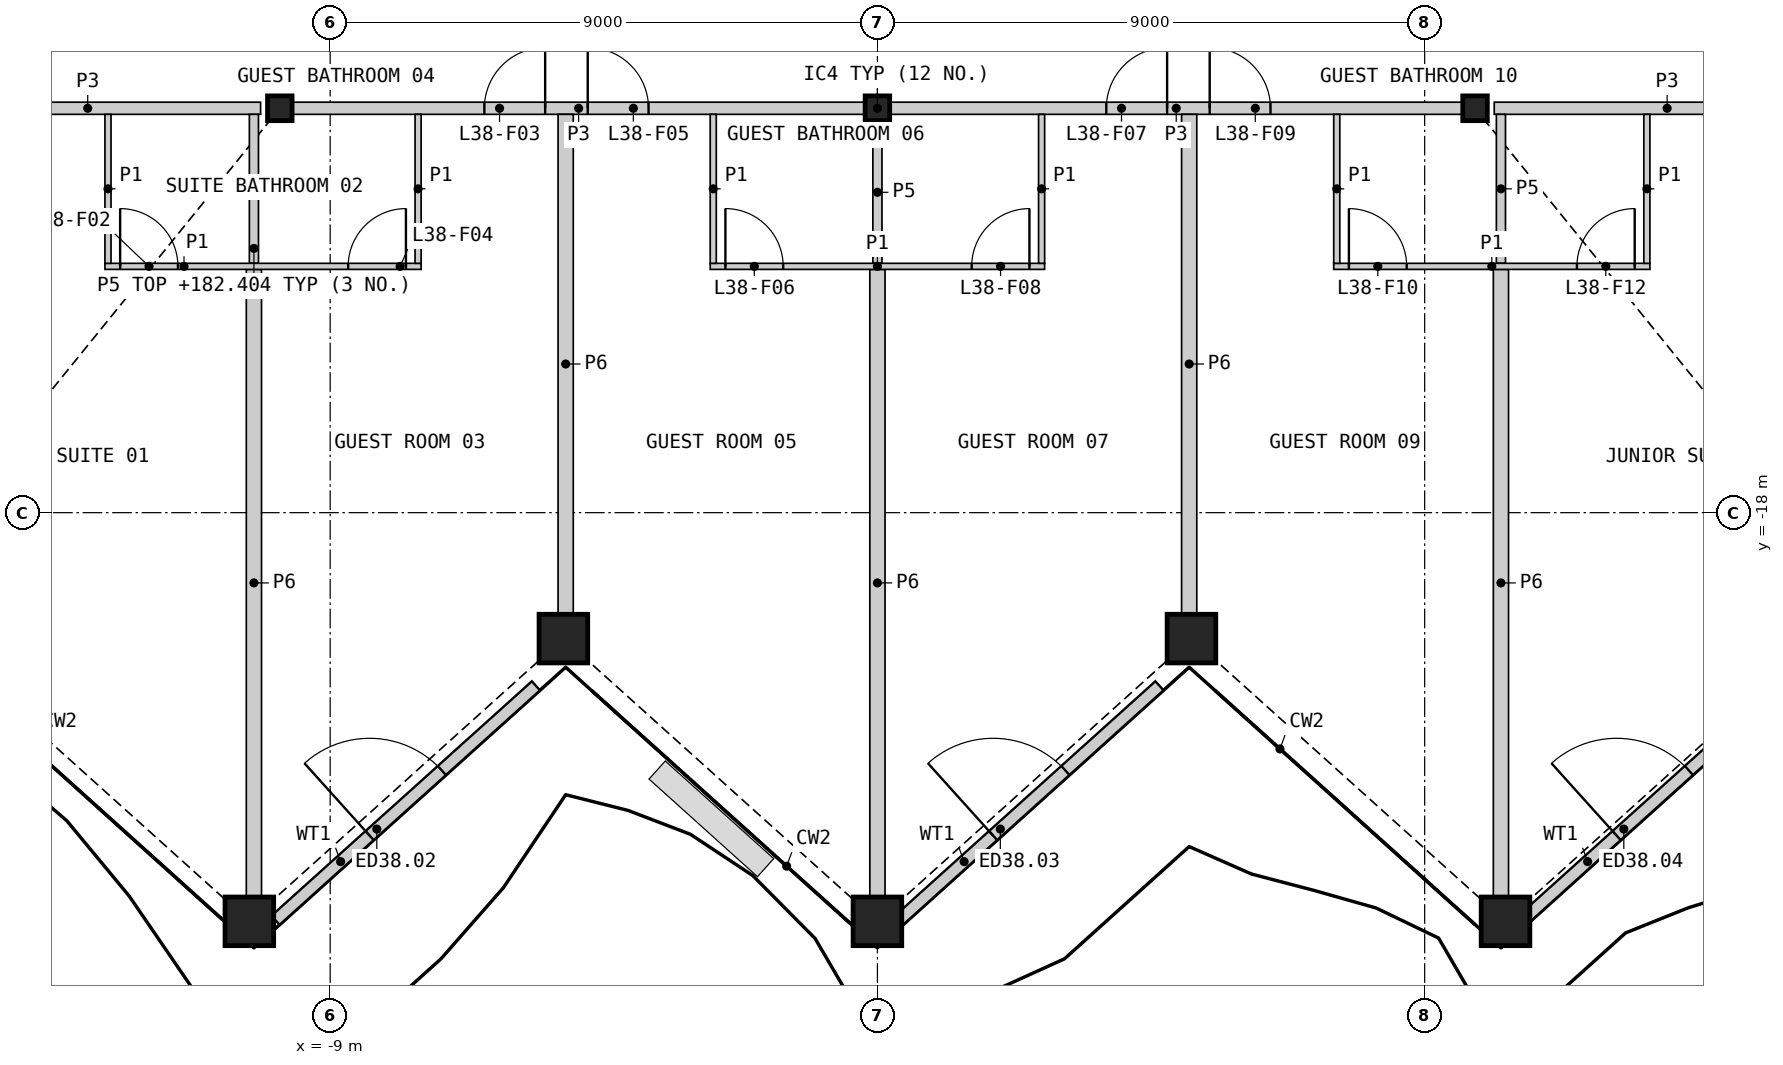
"""IFC4 building model, lengths in metres.
Left out: names, types, materials, properties, quantities, classifications, styles, units other than length and angle.
Written with IfcOpenShell. Run it as: python <this file> out.ifc"""

import sys

from ifc_helpers import new_model, si_unit, direction, frame, frame_2d, origin, origin_2d, place, context, subcontext, project, spatial, rectangle, hollow_rectangle, i_section, extrude, element, fill, save


model = new_model("IFC4")
c1 = context("Model", 3, precision=1e-05, world=origin(), true_north=direction((0.0, 1.0)))
c2 = subcontext(c1, "Body", "Model", "MODEL_VIEW")
j1 = project(units=[si_unit("LENGTHUNIT", "METRE"), si_unit("PLANEANGLEUNIT", "RADIAN")], contexts=[c1])
p1 = place(None, origin())
s1 = spatial("IfcSite", under=j1, at=p1, CompositionType="ELEMENT")
p2 = place(p1, origin())
s2 = spatial("IfcBuilding", under=s1, at=p2, CompositionType="ELEMENT")
p3 = place(p2, frame((0.0, 0.0, 180.0)))
s3 = spatial("IfcBuildingStorey", under=s2, at=p3, CompositionType="ELEMENT", Elevation=180.0)
for number, where, z_axis, x_axis in (
    (1, (-10.329, -24.722, 0.0), (0.0, 0.0, 1.0), (1.0, 0.0, 0.0)),
    (2, (-5.165, -20.071, 0.0), (0.0, 0.0, 1.0), (1.0, 0.0, 0.0)),
    (3, (0.0, -24.722, 0.0), (0.0, 0.0, 1.0), (1.0, 0.0, 0.0)),
    (4, (5.165, -20.071, 0.0), (0.0, 0.0, 1.0), (1.0, 0.0, 0.0)),
    (5, (10.329, -24.722, 0.0), (0.0, 0.0, 1.0), (1.0, 0.0, 0.0)),
):
    element("IfcColumn", number, at=place(p3, frame(where, z_axis=z_axis, x_axis=x_axis)), inside=s3, PredefinedType="COLUMN", context=c2, shape_type="SweptSolid", body=[
        extrude(hollow_rectangle(XDim=0.8, YDim=0.8, WallThickness=0.05, at=origin_2d()), origin(), (0.0, 0.0, 1.0), 3.6),
    ])
for number, where, z_axis, x_axis in (
    (6, (-9.828, -11.349, 0.0), (0.0, 0.0, 1.0), (1.0, 0.0, 0.0)),
    (7, (0.0, -11.349, 0.0), (0.0, 0.0, 1.0), (1.0, 0.0, 0.0)),
    (8, (9.828, -11.349, 0.0), (0.0, 0.0, 1.0), (1.0, 0.0, 0.0)),
):
    element("IfcColumn", number, at=place(p3, frame(where, z_axis=z_axis, x_axis=x_axis)), inside=s3, PredefinedType="COLUMN", context=c2, shape_type="SweptSolid", body=[
        extrude(i_section(OverallWidth=0.404, OverallDepth=0.407, WebThickness=0.027, FlangeThickness=0.044, at=origin_2d()), origin(), (0.0, 0.0, 1.0), 3.6),
    ])
p4 = place(p3, frame((-9.899, -24.704, 0.0), z_axis=(0.0, 0.0, 1.0), x_axis=(0.74312139518, 0.669156627424, 0.0)))
e9 = element("IfcWall", 9, at=p4, inside=s3, PredefinedType="SOLIDWALL", context=c2, shape_type="SweptSolid", body=[
    extrude(rectangle(XDim=5.763, YDim=0.2, at=frame_2d((2.882, 0.0))), origin(), (0.0, 0.0, 1.0), 2.701),
])
p5 = place(p4, frame((2.082, 0.0, 0.0)))
e10 = element("IfcOpeningElement", 10, at=p5, cuts=e9, PredefinedType="OPENING", context=c2, shape_type="SweptSolid", body=[
    extrude(rectangle(XDim=1.6, YDim=2.4, at=frame_2d((0.8, 1.2))), frame((0.0, 0.11, 0.0), z_axis=(0.0, -1.0, 0.0), x_axis=(1.0, 0.0, 0.0)), (0.0, 0.0, 1.0), 0.22),
])
p6 = place(p3, frame((0.355, -24.704, 0.0), z_axis=(0.0, 0.0, 1.0), x_axis=(0.743140362926, 0.669135562491, 0.0)))
e11 = element("IfcWall", 11, at=p6, inside=s3, PredefinedType="SOLIDWALL", context=c2, shape_type="SweptSolid", body=[
    extrude(rectangle(XDim=5.763, YDim=0.2, at=frame_2d((2.882, 0.0))), origin(), (0.0, 0.0, 1.0), 2.701),
])
p7 = place(p6, frame((2.082, 0.0, 0.0)))
e12 = element("IfcOpeningElement", 12, at=p7, cuts=e11, PredefinedType="OPENING", context=c2, shape_type="SweptSolid", body=[
    extrude(rectangle(XDim=1.6, YDim=2.4, at=frame_2d((0.8, 1.2))), frame((0.0, 0.11, 0.0), z_axis=(0.0, -1.0, 0.0), x_axis=(1.0, 0.0, 0.0)), (0.0, 0.0, 1.0), 0.22),
])
p8 = place(p3, frame((10.609, -24.704, 0.0), z_axis=(0.0, 0.0, 1.0), x_axis=(0.743140362926, 0.669135562491, 0.0)))
e13 = element("IfcWall", 13, at=p8, inside=s3, PredefinedType="SOLIDWALL", context=c2, shape_type="SweptSolid", body=[
    extrude(rectangle(XDim=5.763, YDim=0.2, at=frame_2d((2.882, 0.0))), origin(), (0.0, 0.0, 1.0), 2.701),
])
p9 = place(p8, frame((2.082, 0.0, 0.0)))
e14 = element("IfcOpeningElement", 14, at=p9, cuts=e13, PredefinedType="OPENING", context=c2, shape_type="SweptSolid", body=[
    extrude(rectangle(XDim=1.6, YDim=2.4, at=frame_2d((0.8, 1.2))), frame((0.0, 0.11, 0.0), z_axis=(0.0, -1.0, 0.0), x_axis=(1.0, 0.0, 0.0)), (0.0, 0.0, 1.0), 0.22),
])
for number, where, z_axis, x_axis in (
    (15, (-10.254, -24.312, 0.0), (0.0, 0.0, 1.0), (0.0, 1.0, 0.0)),
    (16, (0.0, -24.312, 0.0), (0.0, 0.0, 1.0), (0.0, 1.0, 0.0)),
    (17, (10.254, -24.312, 0.0), (0.0, 0.0, 1.0), (0.0, 1.0, 0.0)),
):
    element("IfcWall", number, at=place(p3, frame(where, z_axis=z_axis, x_axis=x_axis)), inside=s3, PredefinedType="PARTITIONING", context=c2, shape_type="SweptSolid", body=[
        extrude(rectangle(XDim=10.313, YDim=0.25, at=frame_2d((5.156, 0.0))), origin(), (0.0, 0.0, 1.0), 2.404),
    ])
p10 = place(p3, frame((-9.615, -11.349, 0.0), z_axis=(0.0, 0.0, 1.0), x_axis=(1.0, 0.0, 0.0)))
e18 = element("IfcWall", 18, at=p10, inside=s3, PredefinedType="PARTITIONING", context=c2, shape_type="SweptSolid", body=[
    extrude(rectangle(XDim=9.401, YDim=0.2, at=frame_2d((4.701, 0.0))), origin(), (0.0, 0.0, 1.0), 3.25),
])
p11 = place(p10, frame((3.15, 0.0, 0.0)))
e19 = element("IfcOpeningElement", 19, at=p11, cuts=e18, PredefinedType="OPENING", context=c2, shape_type="SweptSolid", body=[
    extrude(rectangle(XDim=1.0, YDim=2.1, at=frame_2d((0.5, 1.05))), frame((0.0, 0.11, 0.0), z_axis=(0.0, -1.0, 0.0), x_axis=(1.0, 0.0, 0.0)), (0.0, 0.0, 1.0), 0.22),
])
p12 = place(p10, frame((4.851, 0.0, 0.0)))
e20 = element("IfcOpeningElement", 20, at=p12, cuts=e18, PredefinedType="OPENING", context=c2, shape_type="SweptSolid", body=[
    extrude(rectangle(XDim=1.0, YDim=2.1, at=frame_2d((0.5, 1.05))), frame((0.0, 0.11, 0.0), z_axis=(0.0, -1.0, 0.0), x_axis=(1.0, 0.0, 0.0)), (0.0, 0.0, 1.0), 0.22),
])
p13 = place(p3, frame((0.214, -11.349, 0.0), z_axis=(0.0, 0.0, 1.0), x_axis=(1.0, 0.0, 0.0)))
e21 = element("IfcWall", 21, at=p13, inside=s3, PredefinedType="PARTITIONING", context=c2, shape_type="SweptSolid", body=[
    extrude(rectangle(XDim=9.401, YDim=0.2, at=frame_2d((4.701, 0.0))), origin(), (0.0, 0.0, 1.0), 3.25),
])
p14 = place(p13, frame((3.551, 0.0, 0.0)))
e22 = element("IfcOpeningElement", 22, at=p14, cuts=e21, PredefinedType="OPENING", context=c2, shape_type="SweptSolid", body=[
    extrude(rectangle(XDim=1.0, YDim=2.1, at=frame_2d((0.5, 1.05))), frame((0.0, 0.11, 0.0), z_axis=(0.0, -1.0, 0.0), x_axis=(1.0, 0.0, 0.0)), (0.0, 0.0, 1.0), 0.22),
])
p15 = place(p13, frame((5.251, 0.0, 0.0)))
e23 = element("IfcOpeningElement", 23, at=p15, cuts=e21, PredefinedType="OPENING", context=c2, shape_type="SweptSolid", body=[
    extrude(rectangle(XDim=1.0, YDim=2.1, at=frame_2d((0.5, 1.05))), frame((0.0, 0.11, 0.0), z_axis=(0.0, -1.0, 0.0), x_axis=(1.0, 0.0, 0.0)), (0.0, 0.0, 1.0), 0.22),
])
for number, where, z_axis, x_axis in (
    (24, (-5.127, -19.661, 0.0), (0.0, 0.0, 1.0), (0.0, 1.0, 0.0)),
    (25, (5.127, -19.661, 0.0), (0.0, 0.0, 1.0), (0.0, 1.0, 0.0)),
):
    element("IfcWall", number, at=place(p3, frame(where, z_axis=z_axis, x_axis=x_axis)), inside=s3, PredefinedType="PARTITIONING", context=c2, shape_type="SweptSolid", body=[
        extrude(rectangle(XDim=8.212, YDim=0.25, at=frame_2d((4.106, 0.0))), origin(), (0.0, 0.0, 1.0), 2.404),
    ])
p16 = place(p3, frame((-15.831, -11.349, 0.0), z_axis=(0.0, 0.0, 1.0), x_axis=(1.0, 0.0, 0.0)))
e26 = element("IfcWall", 26, at=p16, inside=s3, PredefinedType="PARTITIONING", context=c2, shape_type="SweptSolid", body=[
    extrude(rectangle(XDim=5.687, YDim=0.2, at=frame_2d((2.843, 0.0))), origin(), (0.0, 0.0, 1.0), 3.25),
])
p17 = place(p16, frame((0.352, 0.0, 0.0)))
e27 = element("IfcOpeningElement", 27, at=p17, cuts=e26, PredefinedType="OPENING", context=c2, shape_type="SweptSolid", body=[
    extrude(rectangle(XDim=1.1, YDim=2.1, at=frame_2d((0.55, 1.05))), frame((0.0, 0.11, 0.0), z_axis=(0.0, -1.0, 0.0), x_axis=(1.0, 0.0, 0.0)), (0.0, 0.0, 1.0), 0.22),
])
p18 = place(p3, frame((10.144, -11.349, 0.0), z_axis=(0.0, 0.0, 1.0), x_axis=(1.0, 0.0, 0.0)))
e28 = element("IfcWall", 28, at=p18, inside=s3, PredefinedType="PARTITIONING", context=c2, shape_type="SweptSolid", body=[
    extrude(rectangle(XDim=5.687, YDim=0.2, at=frame_2d((2.843, 0.0))), origin(), (0.0, 0.0, 1.0), 3.25),
])
p19 = place(p18, frame((4.235, 0.0, 0.0)))
e29 = element("IfcOpeningElement", 29, at=p19, cuts=e28, PredefinedType="OPENING", context=c2, shape_type="SweptSolid", body=[
    extrude(rectangle(XDim=1.1, YDim=2.1, at=frame_2d((0.55, 1.05))), frame((0.0, 0.11, 0.0), z_axis=(0.0, -1.0, 0.0), x_axis=(1.0, 0.0, 0.0)), (0.0, 0.0, 1.0), 0.22),
])
for number, where, z_axis, x_axis in (
    (30, (-10.254, -13.899, 0.0), (0.0, 0.0, 1.0), (0.0, 1.0, 0.0)),
    (31, (10.254, -13.899, 0.0), (0.0, 0.0, 1.0), (0.0, 1.0, 0.0)),
):
    element("IfcWall", number, at=place(p3, frame(where, z_axis=z_axis, x_axis=x_axis)), inside=s3, PredefinedType="PLUMBINGWALL", context=c2, shape_type="SweptSolid", body=[
        extrude(rectangle(XDim=2.45, YDim=0.15, at=frame_2d((1.225, 0.0))), origin(), (0.0, 0.0, 1.0), 2.404),
    ])
p20 = place(p3, frame((0.0, -13.899, 0.0), z_axis=(0.0, 0.0, 1.0), x_axis=(0.0, 1.0, 0.0)))
e32 = element("IfcWall", 32, at=p20, inside=s3, PredefinedType="PLUMBINGWALL", context=c2, shape_type="SweptSolid", body=[
    extrude(rectangle(XDim=2.336, YDim=0.15, at=frame_2d((1.168, 0.0))), origin(), (0.0, 0.0, 1.0), 2.404),
])
p21 = place(p3, frame((-2.75, -13.949, 0.0), z_axis=(0.0, 0.0, 1.0), x_axis=(1.0, 0.0, 0.0)))
e33 = element("IfcWall", 33, at=p21, inside=s3, PredefinedType="PARTITIONING", context=c2, shape_type="SweptSolid", body=[
    extrude(rectangle(XDim=5.5, YDim=0.1, at=frame_2d((2.75, 0.0))), origin(), (0.0, 0.0, 1.0), 2.404),
])
p22 = place(p21, frame((0.25, 0.0, 0.0)))
e34 = element("IfcOpeningElement", 34, at=p22, cuts=e33, PredefinedType="OPENING", context=c2, shape_type="SweptSolid", body=[
    extrude(rectangle(XDim=0.95, YDim=2.1, at=frame_2d((0.475, 1.05))), frame((0.0, 0.06, 0.0), z_axis=(0.0, -1.0, 0.0), x_axis=(1.0, 0.0, 0.0)), (0.0, 0.0, 1.0), 0.12),
])
p23 = place(p21, frame((4.3, 0.0, 0.0)))
e35 = element("IfcOpeningElement", 35, at=p23, cuts=e33, PredefinedType="OPENING", context=c2, shape_type="SweptSolid", body=[
    extrude(rectangle(XDim=0.95, YDim=2.1, at=frame_2d((0.475, 1.05))), frame((0.0, 0.06, 0.0), z_axis=(0.0, -1.0, 0.0), x_axis=(1.0, 0.0, 0.0)), (0.0, 0.0, 1.0), 0.12),
])
p24 = place(p3, frame((-12.704, -13.949, 0.0), z_axis=(0.0, 0.0, 1.0), x_axis=(1.0, 0.0, 0.0)))
e36 = element("IfcWall", 36, at=p24, inside=s3, PredefinedType="PARTITIONING", context=c2, shape_type="SweptSolid", body=[
    extrude(rectangle(XDim=5.2, YDim=0.1, at=frame_2d((2.6, 0.0))), origin(), (0.0, 0.0, 1.0), 2.404),
])
p25 = place(p24, frame((0.25, 0.0, 0.0)))
e37 = element("IfcOpeningElement", 37, at=p25, cuts=e36, PredefinedType="OPENING", context=c2, shape_type="SweptSolid", body=[
    extrude(rectangle(XDim=0.95, YDim=2.1, at=frame_2d((0.475, 1.05))), frame((0.0, 0.06, 0.0), z_axis=(0.0, -1.0, 0.0), x_axis=(1.0, 0.0, 0.0)), (0.0, 0.0, 1.0), 0.12),
])
p26 = place(p24, frame((4.0, 0.0, 0.0)))
e38 = element("IfcOpeningElement", 38, at=p26, cuts=e36, PredefinedType="OPENING", context=c2, shape_type="SweptSolid", body=[
    extrude(rectangle(XDim=0.95, YDim=2.1, at=frame_2d((0.475, 1.05))), frame((0.0, 0.06, 0.0), z_axis=(0.0, -1.0, 0.0), x_axis=(1.0, 0.0, 0.0)), (0.0, 0.0, 1.0), 0.12),
])
p27 = place(p3, frame((7.504, -13.949, 0.0), z_axis=(0.0, 0.0, 1.0), x_axis=(1.0, 0.0, 0.0)))
e39 = element("IfcWall", 39, at=p27, inside=s3, PredefinedType="PARTITIONING", context=c2, shape_type="SweptSolid", body=[
    extrude(rectangle(XDim=5.2, YDim=0.1, at=frame_2d((2.6, 0.0))), origin(), (0.0, 0.0, 1.0), 2.404),
])
p28 = place(p27, frame((0.25, 0.0, 0.0)))
e40 = element("IfcOpeningElement", 40, at=p28, cuts=e39, PredefinedType="OPENING", context=c2, shape_type="SweptSolid", body=[
    extrude(rectangle(XDim=0.95, YDim=2.1, at=frame_2d((0.475, 1.05))), frame((0.0, 0.06, 0.0), z_axis=(0.0, -1.0, 0.0), x_axis=(1.0, 0.0, 0.0)), (0.0, 0.0, 1.0), 0.12),
])
p29 = place(p27, frame((4.0, 0.0, 0.0)))
e41 = element("IfcOpeningElement", 41, at=p29, cuts=e39, PredefinedType="OPENING", context=c2, shape_type="SweptSolid", body=[
    extrude(rectangle(XDim=0.95, YDim=2.1, at=frame_2d((0.475, 1.05))), frame((0.0, 0.06, 0.0), z_axis=(0.0, -1.0, 0.0), x_axis=(1.0, 0.0, 0.0)), (0.0, 0.0, 1.0), 0.12),
])
for number, where, z_axis, x_axis in (
    (42, (-12.654, -13.899, 0.0), (0.0, 0.0, 1.0), (0.0, 1.0, 0.0)),
    (43, (-7.554, -13.899, 0.0), (0.0, 0.0, 1.0), (0.0, 1.0, 0.0)),
    (44, (-2.7, -13.899, 0.0), (0.0, 0.0, 1.0), (0.0, 1.0, 0.0)),
    (45, (2.7, -13.899, 0.0), (0.0, 0.0, 1.0), (0.0, 1.0, 0.0)),
    (46, (7.554, -13.899, 0.0), (0.0, 0.0, 1.0), (0.0, 1.0, 0.0)),
    (47, (12.654, -13.899, 0.0), (0.0, 0.0, 1.0), (0.0, 1.0, 0.0)),
):
    element("IfcWall", number, at=place(p3, frame(where, z_axis=z_axis, x_axis=x_axis)), inside=s3, PredefinedType="PARTITIONING", context=c2, shape_type="SweptSolid", body=[
        extrude(rectangle(XDim=2.45, YDim=0.1, at=frame_2d((1.225, 0.0))), origin(), (0.0, 0.0, 1.0), 2.404),
    ])
p30 = place(p5, origin())
e48 = element("IfcDoor", 48, at=p30, inside=s3, OperationType="DOUBLE_DOOR_SINGLE_SWING", PredefinedType="DOOR", context=c2, shape_type="SweptSolid", body=[
    extrude(rectangle(XDim=1.6, YDim=2.4, at=frame_2d((0.8, 1.2))), frame((0.0, 0.025, 0.0), z_axis=(0.0, -1.0, 0.0), x_axis=(1.0, 0.0, 0.0)), (0.0, 0.0, 1.0), 0.05),
])
fill(e10, e48)
p31 = place(p7, origin())
e49 = element("IfcDoor", 49, at=p31, inside=s3, OperationType="DOUBLE_DOOR_SINGLE_SWING", PredefinedType="DOOR", context=c2, shape_type="SweptSolid", body=[
    extrude(rectangle(XDim=1.6, YDim=2.4, at=frame_2d((0.8, 1.2))), frame((0.0, 0.025, 0.0), z_axis=(0.0, -1.0, 0.0), x_axis=(1.0, 0.0, 0.0)), (0.0, 0.0, 1.0), 0.05),
])
fill(e12, e49)
p32 = place(p9, origin())
e50 = element("IfcDoor", 50, at=p32, inside=s3, OperationType="DOUBLE_DOOR_SINGLE_SWING", PredefinedType="DOOR", context=c2, shape_type="SweptSolid", body=[
    extrude(rectangle(XDim=1.6, YDim=2.4, at=frame_2d((0.8, 1.2))), frame((0.0, 0.025, 0.0), z_axis=(0.0, -1.0, 0.0), x_axis=(1.0, 0.0, 0.0)), (0.0, 0.0, 1.0), 0.05),
])
fill(e14, e50)
p33 = place(p25, origin())
e51 = element("IfcDoor", 51, at=p33, inside=s3, OperationType="SINGLE_SWING_LEFT", PredefinedType="DOOR", context=c2, shape_type="SweptSolid", body=[
    extrude(rectangle(XDim=0.95, YDim=2.1, at=frame_2d((0.475, 1.05))), frame((0.0, 0.025, 0.0), z_axis=(0.0, -1.0, 0.0), x_axis=(1.0, 0.0, 0.0)), (0.0, 0.0, 1.0), 0.05),
])
fill(e37, e51)
p34 = place(p11, origin())
e52 = element("IfcDoor", 52, at=p34, inside=s3, OperationType="SINGLE_SWING_RIGHT", PredefinedType="DOOR", context=c2, shape_type="SweptSolid", body=[
    extrude(rectangle(XDim=1.0, YDim=2.1, at=frame_2d((0.5, 1.05))), frame((0.0, 0.025, 0.0), z_axis=(0.0, -1.0, 0.0), x_axis=(1.0, 0.0, 0.0)), (0.0, 0.0, 1.0), 0.05),
])
fill(e19, e52)
p35 = place(p26, origin())
e53 = element("IfcDoor", 53, at=p35, inside=s3, OperationType="SINGLE_SWING_RIGHT", PredefinedType="DOOR", context=c2, shape_type="SweptSolid", body=[
    extrude(rectangle(XDim=0.95, YDim=2.1, at=frame_2d((0.475, 1.05))), frame((0.0, 0.025, 0.0), z_axis=(0.0, -1.0, 0.0), x_axis=(1.0, 0.0, 0.0)), (0.0, 0.0, 1.0), 0.05),
])
fill(e38, e53)
p36 = place(p12, origin())
e54 = element("IfcDoor", 54, at=p36, inside=s3, OperationType="SINGLE_SWING_LEFT", PredefinedType="DOOR", context=c2, shape_type="SweptSolid", body=[
    extrude(rectangle(XDim=1.0, YDim=2.1, at=frame_2d((0.5, 1.05))), frame((0.0, 0.025, 0.0), z_axis=(0.0, -1.0, 0.0), x_axis=(1.0, 0.0, 0.0)), (0.0, 0.0, 1.0), 0.05),
])
fill(e20, e54)
p37 = place(p22, origin())
e55 = element("IfcDoor", 55, at=p37, inside=s3, OperationType="SINGLE_SWING_LEFT", PredefinedType="DOOR", context=c2, shape_type="SweptSolid", body=[
    extrude(rectangle(XDim=0.95, YDim=2.1, at=frame_2d((0.475, 1.05))), frame((0.0, 0.025, 0.0), z_axis=(0.0, -1.0, 0.0), x_axis=(1.0, 0.0, 0.0)), (0.0, 0.0, 1.0), 0.05),
])
fill(e34, e55)
p38 = place(p14, origin())
e56 = element("IfcDoor", 56, at=p38, inside=s3, OperationType="SINGLE_SWING_RIGHT", PredefinedType="DOOR", context=c2, shape_type="SweptSolid", body=[
    extrude(rectangle(XDim=1.0, YDim=2.1, at=frame_2d((0.5, 1.05))), frame((0.0, 0.025, 0.0), z_axis=(0.0, -1.0, 0.0), x_axis=(1.0, 0.0, 0.0)), (0.0, 0.0, 1.0), 0.05),
])
fill(e22, e56)
p39 = place(p23, origin())
e57 = element("IfcDoor", 57, at=p39, inside=s3, OperationType="SINGLE_SWING_RIGHT", PredefinedType="DOOR", context=c2, shape_type="SweptSolid", body=[
    extrude(rectangle(XDim=0.95, YDim=2.1, at=frame_2d((0.475, 1.05))), frame((0.0, 0.025, 0.0), z_axis=(0.0, -1.0, 0.0), x_axis=(1.0, 0.0, 0.0)), (0.0, 0.0, 1.0), 0.05),
])
fill(e35, e57)
p40 = place(p15, origin())
e58 = element("IfcDoor", 58, at=p40, inside=s3, OperationType="SINGLE_SWING_LEFT", PredefinedType="DOOR", context=c2, shape_type="SweptSolid", body=[
    extrude(rectangle(XDim=1.0, YDim=2.1, at=frame_2d((0.5, 1.05))), frame((0.0, 0.025, 0.0), z_axis=(0.0, -1.0, 0.0), x_axis=(1.0, 0.0, 0.0)), (0.0, 0.0, 1.0), 0.05),
])
fill(e23, e58)
p41 = place(p28, origin())
e59 = element("IfcDoor", 59, at=p41, inside=s3, OperationType="SINGLE_SWING_LEFT", PredefinedType="DOOR", context=c2, shape_type="SweptSolid", body=[
    extrude(rectangle(XDim=0.95, YDim=2.1, at=frame_2d((0.475, 1.05))), frame((0.0, 0.025, 0.0), z_axis=(0.0, -1.0, 0.0), x_axis=(1.0, 0.0, 0.0)), (0.0, 0.0, 1.0), 0.05),
])
fill(e40, e59)
p42 = place(p29, origin())
e60 = element("IfcDoor", 60, at=p42, inside=s3, OperationType="SINGLE_SWING_RIGHT", PredefinedType="DOOR", context=c2, shape_type="SweptSolid", body=[
    extrude(rectangle(XDim=0.95, YDim=2.1, at=frame_2d((0.475, 1.05))), frame((0.0, 0.025, 0.0), z_axis=(0.0, -1.0, 0.0), x_axis=(1.0, 0.0, 0.0)), (0.0, 0.0, 1.0), 0.05),
])
fill(e41, e60)
save(model, sys.argv[1])
